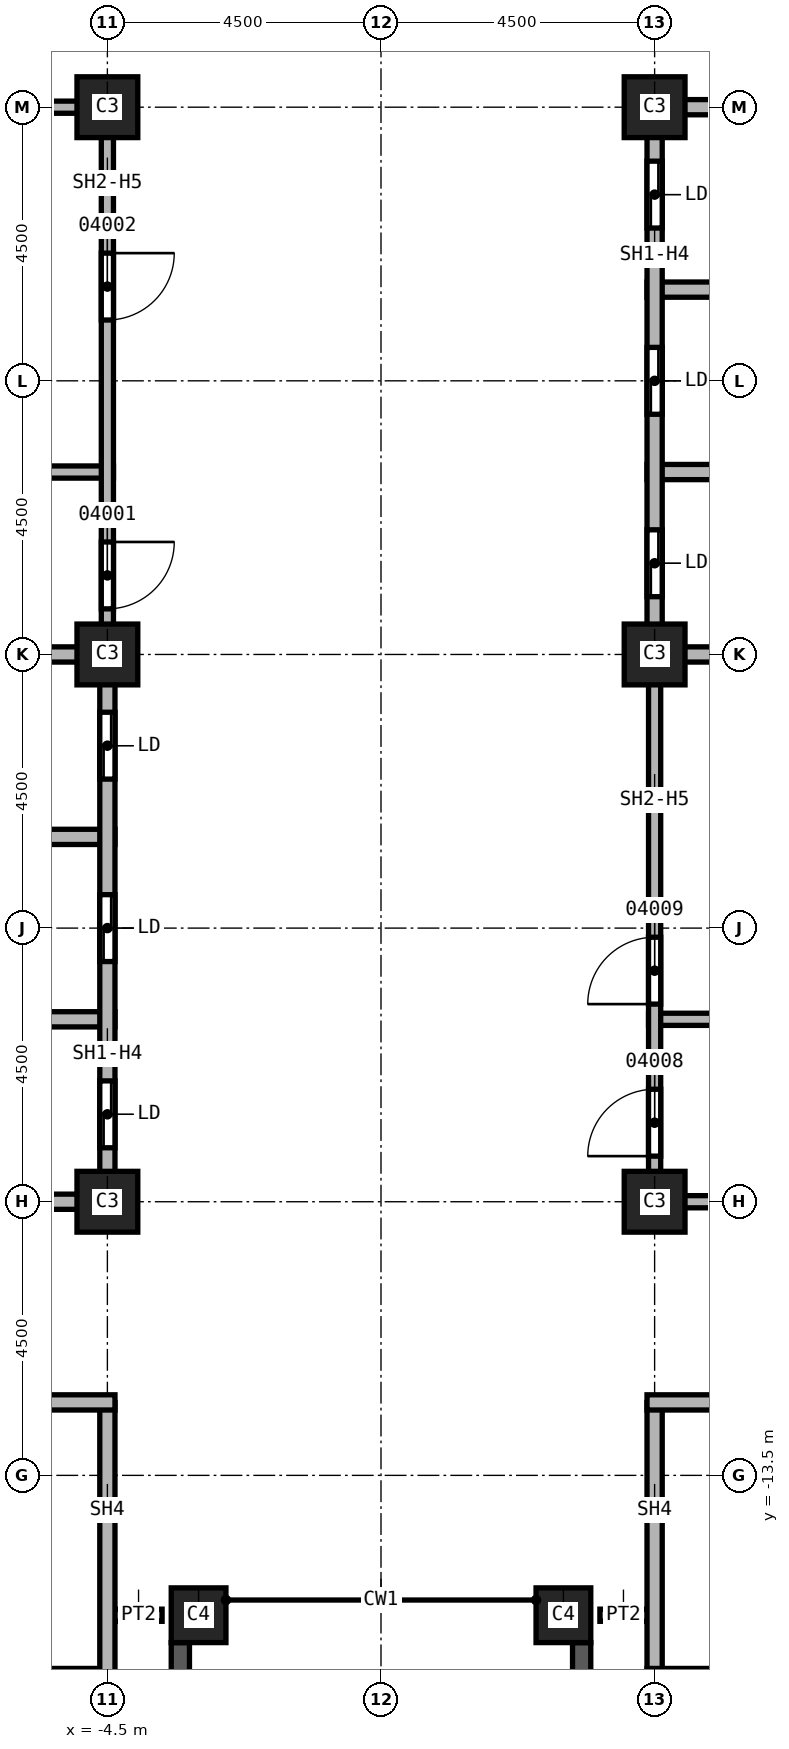
"""IFC4 building model, lengths in metres.
Left out: names, types, materials, properties, quantities, classifications, styles, units other than length and angle.
Written with IfcOpenShell. Run it as: python <this file> out.ifc"""

import sys

from ifc_helpers import new_model, si_unit, direction, frame, frame_2d, origin, origin_2d, place, context, subcontext, project, spatial, rectangle, extrude, element, fill, save


model = new_model("IFC4")
c1 = context("Model", 3, precision=1e-05, world=origin(), true_north=direction((0.0, 1.0)))
c2 = subcontext(c1, "Body", "Model", "MODEL_VIEW")
j1 = project(units=[si_unit("LENGTHUNIT", "METRE"), si_unit("PLANEANGLEUNIT", "RADIAN")], contexts=[c1])
p1 = place(None, origin())
s1 = spatial("IfcSite", under=j1, at=p1, CompositionType="ELEMENT")
p2 = place(p1, origin())
s2 = spatial("IfcBuilding", under=s1, at=p2, CompositionType="ELEMENT")
p3 = place(p2, frame((0.0, 0.0, 104.0)))
s3 = spatial("IfcBuildingStorey", under=s2, at=p3, CompositionType="ELEMENT", Elevation=104.0)
for number, where, z_axis, x_axis in (
    (1, (4.5, 0.0, 0.0), (0.0, 0.0, 1.0), (1.0, 0.0, 0.0)),
    (2, (4.5, 9.0, 0.0), (0.0, 0.0, 1.0), (1.0, 0.0, 0.0)),
    (3, (4.5, -9.0, 0.0), (0.0, 0.0, 1.0), (1.0, 0.0, 0.0)),
    (4, (-4.5, 0.0, 0.0), (0.0, 0.0, 1.0), (1.0, 0.0, 0.0)),
    (5, (-4.5, 9.0, 0.0), (0.0, 0.0, 1.0), (1.0, 0.0, 0.0)),
    (6, (-4.5, -9.0, 0.0), (0.0, 0.0, 1.0), (1.0, 0.0, 0.0)),
):
    element("IfcColumn", number, at=place(p3, frame(where, z_axis=z_axis, x_axis=x_axis)), inside=s3, PredefinedType="COLUMN", context=c2, shape_type="SweptSolid", body=[
        extrude(rectangle(XDim=1.0, YDim=1.0, at=origin_2d()), origin(), (0.0, 0.0, 1.0), 3.7),
    ])
for number, where, z_axis, x_axis in (
    (7, (3.0, -15.8, 0.0), (0.0, 0.0, 1.0), (1.0, 0.0, 0.0)),
    (8, (-3.0, -15.8, 0.0), (0.0, 0.0, 1.0), (1.0, 0.0, 0.0)),
):
    element("IfcColumn", number, at=place(p3, frame(where, z_axis=z_axis, x_axis=x_axis)), inside=s3, PredefinedType="COLUMN", context=c2, shape_type="SweptSolid", body=[
        extrude(rectangle(XDim=0.9, YDim=0.9, at=origin_2d()), origin(), (0.0, 0.0, 1.0), 3.7),
    ])
p4 = place(p3, frame((-3.3, -24.2, 0.0), z_axis=(0.0, 0.0, 1.0), x_axis=(0.0, 1.0, 0.0)))
e9 = element("IfcWall", 9, at=p4, inside=s3, PredefinedType="SOLIDWALL", context=c2, shape_type="SweptSolid", body=[
    extrude(rectangle(XDim=7.95, YDim=0.3, at=frame_2d((3.975, 0.0))), origin(), (0.0, 0.0, 1.0), 3.1),
])
p5 = place(p4, frame((0.788, 0.0, 0.8)))
e10 = element("IfcOpeningElement", 10, at=p5, cuts=e9, PredefinedType="OPENING", context=c2, shape_type="SweptSolid", body=[
    extrude(rectangle(XDim=2.4, YDim=1.95, at=frame_2d((1.2, 0.975))), frame((0.0, 0.15, 0.0), z_axis=(0.0, -1.0, 0.0), x_axis=(1.0, 0.0, 0.0)), (0.0, 0.0, 1.0), 0.3),
])
p6 = place(p4, frame((4.762, 0.0, 0.8)))
e11 = element("IfcOpeningElement", 11, at=p6, cuts=e9, PredefinedType="OPENING", context=c2, shape_type="SweptSolid", body=[
    extrude(rectangle(XDim=2.4, YDim=1.95, at=frame_2d((1.2, 0.975))), frame((0.0, 0.15, 0.0), z_axis=(0.0, -1.0, 0.0), x_axis=(1.0, 0.0, 0.0)), (0.0, 0.0, 1.0), 0.3),
])
p7 = place(p3, frame((3.3, -16.25, 0.0), z_axis=(0.0, 0.0, 1.0), x_axis=(0.0, -1.0, 0.0)))
e12 = element("IfcWall", 12, at=p7, inside=s3, PredefinedType="SOLIDWALL", context=c2, shape_type="SweptSolid", body=[
    extrude(rectangle(XDim=7.95, YDim=0.3, at=frame_2d((3.975, 0.0))), origin(), (0.0, 0.0, 1.0), 3.1),
])
p8 = place(p7, frame((0.788, 0.0, 0.8)))
e13 = element("IfcOpeningElement", 13, at=p8, cuts=e12, PredefinedType="OPENING", context=c2, shape_type="SweptSolid", body=[
    extrude(rectangle(XDim=2.4, YDim=1.95, at=frame_2d((1.2, 0.975))), frame((0.0, 0.15, 0.0), z_axis=(0.0, -1.0, 0.0), x_axis=(1.0, 0.0, 0.0)), (0.0, 0.0, 1.0), 0.3),
])
p9 = place(p7, frame((4.762, 0.0, 0.8)))
e14 = element("IfcOpeningElement", 14, at=p9, cuts=e12, PredefinedType="OPENING", context=c2, shape_type="SweptSolid", body=[
    extrude(rectangle(XDim=2.4, YDim=1.95, at=frame_2d((1.2, 0.975))), frame((0.0, 0.15, 0.0), z_axis=(0.0, -1.0, 0.0), x_axis=(1.0, 0.0, 0.0)), (0.0, 0.0, 1.0), 0.3),
])
for number, where, z_axis, x_axis in (
    (15, (-3.6, -15.8, 0.0), (0.0, 0.0, 1.0), (-1.0, 0.0, 0.0)),
    (16, (4.5, -15.8, 0.0), (0.0, 0.0, 1.0), (-1.0, 0.0, 0.0)),
):
    element("IfcWall", number, at=place(p3, frame(where, z_axis=z_axis, x_axis=x_axis)), inside=s3, PredefinedType="PARTITIONING", context=c2, shape_type="SweptSolid", body=[
        extrude(rectangle(XDim=0.9, YDim=0.2, at=frame_2d((0.45, 0.0))), origin(), (0.0, 0.0, 1.0), 3.7),
    ])
p10 = place(p3, frame((-7.625, 3.0, 0.0), z_axis=(0.0, 0.0, 1.0), x_axis=(1.0, 0.0, 0.0)))
e17 = element("IfcWall", 17, at=p10, inside=s3, PredefinedType="SOLIDWALL", context=c2, shape_type="SweptSolid", body=[
    extrude(rectangle(XDim=3.225, YDim=0.2, at=frame_2d((1.613, 0.0))), origin(), (0.0, 0.0, 1.0), 3.7),
])
p11 = place(p3, frame((-7.5, 9.0, 0.0), z_axis=(0.0, 0.0, 1.0), x_axis=(1.0, 0.0, 0.0)))
e18 = element("IfcWall", 18, at=p11, inside=s3, PredefinedType="SOLIDWALL", context=c2, shape_type="SweptSolid", body=[
    extrude(rectangle(XDim=3.0, YDim=0.2, at=frame_2d((1.5, 0.0))), origin(), (0.0, 0.0, 1.0), 2.938),
])
p12 = place(p3, frame((-4.5, 9.1, 0.0), z_axis=(0.0, 0.0, 1.0), x_axis=(0.0, -1.0, 0.0)))
e19 = element("IfcWall", 19, at=p12, inside=s3, PredefinedType="SOLIDWALL", context=c2, shape_type="SweptSolid", body=[
    extrude(rectangle(XDim=9.1, YDim=0.2, at=frame_2d((4.55, 0.0))), origin(), (0.0, 0.0, 1.0), 2.938),
])
p13 = place(p12, frame((7.25, 0.0, 0.0)))
e20 = element("IfcOpeningElement", 20, at=p13, cuts=e19, PredefinedType="OPENING", context=c2, shape_type="SweptSolid", body=[
    extrude(rectangle(XDim=1.1, YDim=2.1, at=frame_2d((0.55, 1.05))), frame((0.0, 0.1, 0.0), z_axis=(0.0, -1.0, 0.0), x_axis=(1.0, 0.0, 0.0)), (0.0, 0.0, 1.0), 0.2),
])
p14 = place(p12, frame((2.5, 0.0, 0.0)))
e21 = element("IfcOpeningElement", 21, at=p14, cuts=e19, PredefinedType="OPENING", context=c2, shape_type="SweptSolid", body=[
    extrude(rectangle(XDim=1.1, YDim=2.1, at=frame_2d((0.55, 1.05))), frame((0.0, 0.1, 0.0), z_axis=(0.0, -1.0, 0.0), x_axis=(1.0, 0.0, 0.0)), (0.0, 0.0, 1.0), 0.2),
])
p15 = place(p3, frame((4.4, -6.0, 0.0), z_axis=(0.0, 0.0, 1.0), x_axis=(1.0, 0.0, 0.0)))
e22 = element("IfcWall", 22, at=p15, inside=s3, PredefinedType="SOLIDWALL", context=c2, shape_type="SweptSolid", body=[
    extrude(rectangle(XDim=3.2, YDim=0.2, at=frame_2d((1.6, 0.0))), origin(), (0.0, 0.0, 1.0), 3.7),
])
p16 = place(p3, frame((4.5, -9.1, 0.0), z_axis=(0.0, 0.0, 1.0), x_axis=(0.0, 1.0, 0.0)))
e23 = element("IfcWall", 23, at=p16, inside=s3, PredefinedType="SOLIDWALL", context=c2, shape_type="SweptSolid", body=[
    extrude(rectangle(XDim=9.1, YDim=0.2, at=frame_2d((4.55, 0.0))), origin(), (0.0, 0.0, 1.0), 2.938),
])
p17 = place(p16, frame((0.85, 0.0, 0.0)))
e24 = element("IfcOpeningElement", 24, at=p17, cuts=e23, PredefinedType="OPENING", context=c2, shape_type="SweptSolid", body=[
    extrude(rectangle(XDim=1.1, YDim=2.1, at=frame_2d((0.55, 1.05))), frame((0.0, 0.1, 0.0), z_axis=(0.0, -1.0, 0.0), x_axis=(1.0, 0.0, 0.0)), (0.0, 0.0, 1.0), 0.2),
])
p18 = place(p16, frame((3.35, 0.0, 0.0)))
e25 = element("IfcOpeningElement", 25, at=p18, cuts=e23, PredefinedType="OPENING", context=c2, shape_type="SweptSolid", body=[
    extrude(rectangle(XDim=1.1, YDim=2.1, at=frame_2d((0.55, 1.05))), frame((0.0, 0.1, 0.0), z_axis=(0.0, -1.0, 0.0), x_axis=(1.0, 0.0, 0.0)), (0.0, 0.0, 1.0), 0.2),
])
p19 = place(p3, frame((7.5, -9.0, 0.0), z_axis=(0.0, 0.0, 1.0), x_axis=(-1.0, 0.0, 0.0)))
e26 = element("IfcWall", 26, at=p19, inside=s3, PredefinedType="SOLIDWALL", context=c2, shape_type="SweptSolid", body=[
    extrude(rectangle(XDim=3.0, YDim=0.2, at=frame_2d((1.5, 0.0))), origin(), (0.0, 0.0, 1.0), 2.938),
])
p20 = place(p3, frame((-13.625, -3.0, 0.0), z_axis=(0.0, 0.0, 1.0), x_axis=(1.0, 0.0, 0.0)))
e27 = element("IfcWall", 27, at=p20, inside=s3, PredefinedType="SOLIDWALL", context=c2, shape_type="SweptSolid", body=[
    extrude(rectangle(XDim=9.25, YDim=0.25, at=frame_2d((4.625, 0.0))), origin(), (0.0, 0.0, 1.0), 3.7),
])
p21 = place(p20, frame((3.25, 0.0, 0.0)))
e28 = element("IfcOpeningElement", 28, at=p21, cuts=e27, PredefinedType="OPENING", context=c2, shape_type="SweptSolid", body=[
    extrude(rectangle(XDim=1.1, YDim=2.1, at=frame_2d((0.55, 1.05))), frame((0.0, 0.125, 0.0), z_axis=(0.0, -1.0, 0.0), x_axis=(1.0, 0.0, 0.0)), (0.0, 0.0, 1.0), 0.25),
])
for number, where, z_axis, x_axis in (
    (29, (-7.625, -6.0, 0.0), (0.0, 0.0, 1.0), (1.0, 0.0, 0.0)),
    (30, (-7.625, 0.0, 0.0), (0.0, 0.0, 1.0), (1.0, 0.0, 0.0)),
):
    element("IfcWall", number, at=place(p3, frame(where, z_axis=z_axis, x_axis=x_axis)), inside=s3, PredefinedType="SOLIDWALL", context=c2, shape_type="SweptSolid", body=[
        extrude(rectangle(XDim=3.25, YDim=0.25, at=frame_2d((1.625, 0.0))), origin(), (0.0, 0.0, 1.0), 3.7),
    ])
p22 = place(p3, frame((-4.5, -9.0, 0.0), z_axis=(0.0, 0.0, 1.0), x_axis=(-1.0, 0.0, 0.0)))
e31 = element("IfcWall", 31, at=p22, inside=s3, PredefinedType="SOLIDWALL", context=c2, shape_type="SweptSolid", body=[
    extrude(rectangle(XDim=3.0, YDim=0.25, at=frame_2d((1.5, 0.0))), origin(), (0.0, 0.0, 1.0), 2.938),
])
p23 = place(p3, frame((-4.5, 0.0, 0.0), z_axis=(0.0, 0.0, 1.0), x_axis=(0.0, -1.0, 0.0)))
e32 = element("IfcWall", 32, at=p23, inside=s3, PredefinedType="SOLIDWALL", context=c2, shape_type="SweptSolid", body=[
    extrude(rectangle(XDim=9.125, YDim=0.25, at=frame_2d((4.562, 0.0))), origin(), (0.0, 0.0, 1.0), 2.938),
])
p24 = place(p23, frame((7.012, 0.0, 0.0)))
e33 = element("IfcOpeningElement", 33, at=p24, cuts=e32, PredefinedType="OPENING", context=c2, shape_type="SweptSolid", body=[
    extrude(rectangle(XDim=1.1, YDim=2.1, at=frame_2d((0.55, 1.05))), frame((0.0, 0.125, 0.0), z_axis=(0.0, -1.0, 0.0), x_axis=(1.0, 0.0, 0.0)), (0.0, 0.0, 1.0), 0.25),
])
p25 = place(p23, frame((3.95, 0.0, 0.0)))
e34 = element("IfcOpeningElement", 34, at=p25, cuts=e32, PredefinedType="OPENING", context=c2, shape_type="SweptSolid", body=[
    extrude(rectangle(XDim=1.1, YDim=2.1, at=frame_2d((0.55, 1.05))), frame((0.0, 0.125, 0.0), z_axis=(0.0, -1.0, 0.0), x_axis=(1.0, 0.0, 0.0)), (0.0, 0.0, 1.0), 0.25),
])
p26 = place(p23, frame((0.95, 0.0, 0.0)))
e35 = element("IfcOpeningElement", 35, at=p26, cuts=e32, PredefinedType="OPENING", context=c2, shape_type="SweptSolid", body=[
    extrude(rectangle(XDim=1.1, YDim=2.1, at=frame_2d((0.55, 1.05))), frame((0.0, 0.125, 0.0), z_axis=(0.0, -1.0, 0.0), x_axis=(1.0, 0.0, 0.0)), (0.0, 0.0, 1.0), 0.25),
])
p27 = place(p3, frame((4.375, 0.0, 0.0), z_axis=(0.0, 0.0, 1.0), x_axis=(1.0, 0.0, 0.0)))
e36 = element("IfcWall", 36, at=p27, inside=s3, PredefinedType="SOLIDWALL", context=c2, shape_type="SweptSolid", body=[
    extrude(rectangle(XDim=3.25, YDim=0.25, at=frame_2d((1.625, 0.0))), origin(), (0.0, 0.0, 1.0), 3.7),
])
p28 = place(p3, frame((4.375, 3.0, 0.0), z_axis=(0.0, 0.0, 1.0), x_axis=(1.0, 0.0, 0.0)))
e37 = element("IfcWall", 37, at=p28, inside=s3, PredefinedType="SOLIDWALL", context=c2, shape_type="SweptSolid", body=[
    extrude(rectangle(XDim=9.25, YDim=0.25, at=frame_2d((4.625, 0.0))), origin(), (0.0, 0.0, 1.0), 3.7),
])
p29 = place(p28, frame((3.375, 0.0, 0.0)))
e38 = element("IfcOpeningElement", 38, at=p29, cuts=e37, PredefinedType="OPENING", context=c2, shape_type="SweptSolid", body=[
    extrude(rectangle(XDim=1.1, YDim=2.1, at=frame_2d((0.55, 1.05))), frame((0.0, 0.125, 0.0), z_axis=(0.0, -1.0, 0.0), x_axis=(1.0, 0.0, 0.0)), (0.0, 0.0, 1.0), 0.25),
])
p30 = place(p3, frame((4.375, 6.0, 0.0), z_axis=(0.0, 0.0, 1.0), x_axis=(1.0, 0.0, 0.0)))
e39 = element("IfcWall", 39, at=p30, inside=s3, PredefinedType="SOLIDWALL", context=c2, shape_type="SweptSolid", body=[
    extrude(rectangle(XDim=3.25, YDim=0.25, at=frame_2d((1.625, 0.0))), origin(), (0.0, 0.0, 1.0), 3.7),
])
p31 = place(p3, frame((4.5, 0.0, 0.0), z_axis=(0.0, 0.0, 1.0), x_axis=(0.0, 1.0, 0.0)))
e40 = element("IfcWall", 40, at=p31, inside=s3, PredefinedType="SOLIDWALL", context=c2, shape_type="SweptSolid", body=[
    extrude(rectangle(XDim=9.125, YDim=0.25, at=frame_2d((4.562, 0.0))), origin(), (0.0, 0.0, 1.0), 2.938),
])
p32 = place(p31, frame((0.95, 0.0, 0.0)))
e41 = element("IfcOpeningElement", 41, at=p32, cuts=e40, PredefinedType="OPENING", context=c2, shape_type="SweptSolid", body=[
    extrude(rectangle(XDim=1.1, YDim=2.1, at=frame_2d((0.55, 1.05))), frame((0.0, 0.125, 0.0), z_axis=(0.0, -1.0, 0.0), x_axis=(1.0, 0.0, 0.0)), (0.0, 0.0, 1.0), 0.25),
])
p33 = place(p31, frame((3.95, 0.0, 0.0)))
e42 = element("IfcOpeningElement", 42, at=p33, cuts=e40, PredefinedType="OPENING", context=c2, shape_type="SweptSolid", body=[
    extrude(rectangle(XDim=1.1, YDim=2.1, at=frame_2d((0.55, 1.05))), frame((0.0, 0.125, 0.0), z_axis=(0.0, -1.0, 0.0), x_axis=(1.0, 0.0, 0.0)), (0.0, 0.0, 1.0), 0.25),
])
p34 = place(p31, frame((7.012, 0.0, 0.0)))
e43 = element("IfcOpeningElement", 43, at=p34, cuts=e40, PredefinedType="OPENING", context=c2, shape_type="SweptSolid", body=[
    extrude(rectangle(XDim=1.1, YDim=2.1, at=frame_2d((0.55, 1.05))), frame((0.0, 0.125, 0.0), z_axis=(0.0, -1.0, 0.0), x_axis=(1.0, 0.0, 0.0)), (0.0, 0.0, 1.0), 0.25),
])
p35 = place(p3, frame((4.5, 9.0, 0.0), z_axis=(0.0, 0.0, 1.0), x_axis=(1.0, 0.0, 0.0)))
e44 = element("IfcWall", 44, at=p35, inside=s3, PredefinedType="SOLIDWALL", context=c2, shape_type="SweptSolid", body=[
    extrude(rectangle(XDim=3.0, YDim=0.25, at=frame_2d((1.5, 0.0))), origin(), (0.0, 0.0, 1.0), 2.938),
])
p36 = place(p3, frame((-4.5, -16.8, 0.0), z_axis=(0.0, 0.0, 1.0), x_axis=(-1.0, 0.0, 0.0)))
e45 = element("IfcWall", 45, at=p36, inside=s3, PredefinedType="SOLIDWALL", context=c2, shape_type="SweptSolid", body=[
    extrude(rectangle(XDim=9.0, YDim=0.25, at=frame_2d((4.5, 0.0))), origin(), (0.0, 0.0, 1.0), 3.7),
])
p37 = place(p3, frame((-4.5, -12.3, 0.0), z_axis=(0.0, 0.0, 1.0), x_axis=(0.0, -1.0, 0.0)))
e46 = element("IfcWall", 46, at=p37, inside=s3, PredefinedType="SOLIDWALL", context=c2, shape_type="SweptSolid", body=[
    extrude(rectangle(XDim=4.625, YDim=0.25, at=frame_2d((2.312, 0.0))), origin(), (0.0, 0.0, 1.0), 3.7),
])
p38 = place(p3, frame((-4.375, -12.3, 0.0), z_axis=(0.0, 0.0, 1.0), x_axis=(-1.0, 0.0, 0.0)))
e47 = element("IfcWall", 47, at=p38, inside=s3, PredefinedType="SOLIDWALL", context=c2, shape_type="SweptSolid", body=[
    extrude(rectangle(XDim=9.125, YDim=0.25, at=frame_2d((4.562, 0.0))), origin(), (0.0, 0.0, 1.0), 3.7),
])
p39 = place(p38, frame((7.2, 0.0, 0.0)))
e48 = element("IfcOpeningElement", 48, at=p39, cuts=e47, PredefinedType="OPENING", context=c2, shape_type="SweptSolid", body=[
    extrude(rectangle(XDim=1.2, YDim=2.1, at=frame_2d((0.6, 1.05))), frame((0.0, 0.125, 0.0), z_axis=(0.0, -1.0, 0.0), x_axis=(1.0, 0.0, 0.0)), (0.0, 0.0, 1.0), 0.25),
])
p40 = place(p3, frame((4.5, -16.8, 0.0), z_axis=(0.0, 0.0, 1.0), x_axis=(0.0, 1.0, 0.0)))
e49 = element("IfcWall", 49, at=p40, inside=s3, PredefinedType="SOLIDWALL", context=c2, shape_type="SweptSolid", body=[
    extrude(rectangle(XDim=4.5, YDim=0.25, at=frame_2d((2.25, 0.0))), origin(), (0.0, 0.0, 1.0), 3.7),
])
p41 = place(p3, frame((13.5, -16.8, 0.0), z_axis=(0.0, 0.0, 1.0), x_axis=(-1.0, 0.0, 0.0)))
e50 = element("IfcWall", 50, at=p41, inside=s3, PredefinedType="SOLIDWALL", context=c2, shape_type="SweptSolid", body=[
    extrude(rectangle(XDim=9.125, YDim=0.25, at=frame_2d((4.562, 0.0))), origin(), (0.0, 0.0, 1.0), 3.7),
])
p42 = place(p3, frame((13.5, -12.3, 0.0), z_axis=(0.0, 0.0, 1.0), x_axis=(-1.0, 0.0, 0.0)))
e51 = element("IfcWall", 51, at=p42, inside=s3, PredefinedType="SOLIDWALL", context=c2, shape_type="SweptSolid", body=[
    extrude(rectangle(XDim=9.125, YDim=0.25, at=frame_2d((4.562, 0.0))), origin(), (0.0, 0.0, 1.0), 3.7),
])
p43 = place(p42, frame((0.6, 0.0, 0.0)))
e52 = element("IfcOpeningElement", 52, at=p43, cuts=e51, PredefinedType="OPENING", context=c2, shape_type="SweptSolid", body=[
    extrude(rectangle(XDim=1.2, YDim=2.1, at=frame_2d((0.6, 1.05))), frame((0.0, 0.125, 0.0), z_axis=(0.0, -1.0, 0.0), x_axis=(1.0, 0.0, 0.0)), (0.0, 0.0, 1.0), 0.25),
])
p44 = place(p13, origin())
e53 = element("IfcDoor", 53, at=p44, inside=s3, OperationType="SINGLE_SWING_RIGHT", PredefinedType="DOOR", context=c2, shape_type="SweptSolid", body=[
    extrude(rectangle(XDim=1.1, YDim=2.1, at=frame_2d((0.55, 1.05))), frame((0.0, 0.025, 0.0), z_axis=(0.0, -1.0, 0.0), x_axis=(1.0, 0.0, 0.0)), (0.0, 0.0, 1.0), 0.05),
])
fill(e20, e53)
p45 = place(p14, origin())
e54 = element("IfcDoor", 54, at=p45, inside=s3, OperationType="SINGLE_SWING_LEFT", PredefinedType="DOOR", context=c2, shape_type="SweptSolid", body=[
    extrude(rectangle(XDim=1.1, YDim=2.1, at=frame_2d((0.55, 1.05))), frame((0.0, 0.025, 0.0), z_axis=(0.0, -1.0, 0.0), x_axis=(1.0, 0.0, 0.0)), (0.0, 0.0, 1.0), 0.05),
])
fill(e21, e54)
p46 = place(p17, origin())
e55 = element("IfcDoor", 55, at=p46, inside=s3, OperationType="SINGLE_SWING_LEFT", PredefinedType="DOOR", context=c2, shape_type="SweptSolid", body=[
    extrude(rectangle(XDim=1.1, YDim=2.1, at=frame_2d((0.55, 1.05))), frame((0.0, 0.025, 0.0), z_axis=(0.0, -1.0, 0.0), x_axis=(1.0, 0.0, 0.0)), (0.0, 0.0, 1.0), 0.05),
])
fill(e24, e55)
p47 = place(p18, origin())
e56 = element("IfcDoor", 56, at=p47, inside=s3, OperationType="SINGLE_SWING_RIGHT", PredefinedType="DOOR", context=c2, shape_type="SweptSolid", body=[
    extrude(rectangle(XDim=1.1, YDim=2.1, at=frame_2d((0.55, 1.05))), frame((0.0, 0.025, 0.0), z_axis=(0.0, -1.0, 0.0), x_axis=(1.0, 0.0, 0.0)), (0.0, 0.0, 1.0), 0.05),
])
fill(e25, e56)
p48 = place(p24, origin())
e57 = element("IfcDoor", 57, at=p48, inside=s3, OperationType="SLIDING_TO_LEFT", PredefinedType="DOOR", context=c2, shape_type="SweptSolid", body=[
    extrude(rectangle(XDim=1.1, YDim=2.1, at=frame_2d((0.55, 1.05))), frame((0.0, 0.025, 0.0), z_axis=(0.0, -1.0, 0.0), x_axis=(1.0, 0.0, 0.0)), (0.0, 0.0, 1.0), 0.05),
])
fill(e33, e57)
p49 = place(p25, origin())
e58 = element("IfcDoor", 58, at=p49, inside=s3, OperationType="SLIDING_TO_LEFT", PredefinedType="DOOR", context=c2, shape_type="SweptSolid", body=[
    extrude(rectangle(XDim=1.1, YDim=2.1, at=frame_2d((0.55, 1.05))), frame((0.0, 0.025, 0.0), z_axis=(0.0, -1.0, 0.0), x_axis=(1.0, 0.0, 0.0)), (0.0, 0.0, 1.0), 0.05),
])
fill(e34, e58)
p50 = place(p26, origin())
e59 = element("IfcDoor", 59, at=p50, inside=s3, OperationType="SLIDING_TO_LEFT", PredefinedType="DOOR", context=c2, shape_type="SweptSolid", body=[
    extrude(rectangle(XDim=1.1, YDim=2.1, at=frame_2d((0.55, 1.05))), frame((0.0, 0.025, 0.0), z_axis=(0.0, -1.0, 0.0), x_axis=(1.0, 0.0, 0.0)), (0.0, 0.0, 1.0), 0.05),
])
fill(e35, e59)
p51 = place(p32, origin())
e60 = element("IfcDoor", 60, at=p51, inside=s3, OperationType="SLIDING_TO_LEFT", PredefinedType="DOOR", context=c2, shape_type="SweptSolid", body=[
    extrude(rectangle(XDim=1.1, YDim=2.1, at=frame_2d((0.55, 1.05))), frame((0.0, 0.025, 0.0), z_axis=(0.0, -1.0, 0.0), x_axis=(1.0, 0.0, 0.0)), (0.0, 0.0, 1.0), 0.05),
])
fill(e41, e60)
p52 = place(p33, origin())
e61 = element("IfcDoor", 61, at=p52, inside=s3, OperationType="SLIDING_TO_LEFT", PredefinedType="DOOR", context=c2, shape_type="SweptSolid", body=[
    extrude(rectangle(XDim=1.1, YDim=2.1, at=frame_2d((0.55, 1.05))), frame((0.0, 0.025, 0.0), z_axis=(0.0, -1.0, 0.0), x_axis=(1.0, 0.0, 0.0)), (0.0, 0.0, 1.0), 0.05),
])
fill(e42, e61)
p53 = place(p34, origin())
e62 = element("IfcDoor", 62, at=p53, inside=s3, OperationType="SLIDING_TO_LEFT", PredefinedType="DOOR", context=c2, shape_type="SweptSolid", body=[
    extrude(rectangle(XDim=1.1, YDim=2.1, at=frame_2d((0.55, 1.05))), frame((0.0, 0.025, 0.0), z_axis=(0.0, -1.0, 0.0), x_axis=(1.0, 0.0, 0.0)), (0.0, 0.0, 1.0), 0.05),
])
fill(e43, e62)
save(model, sys.argv[1])
